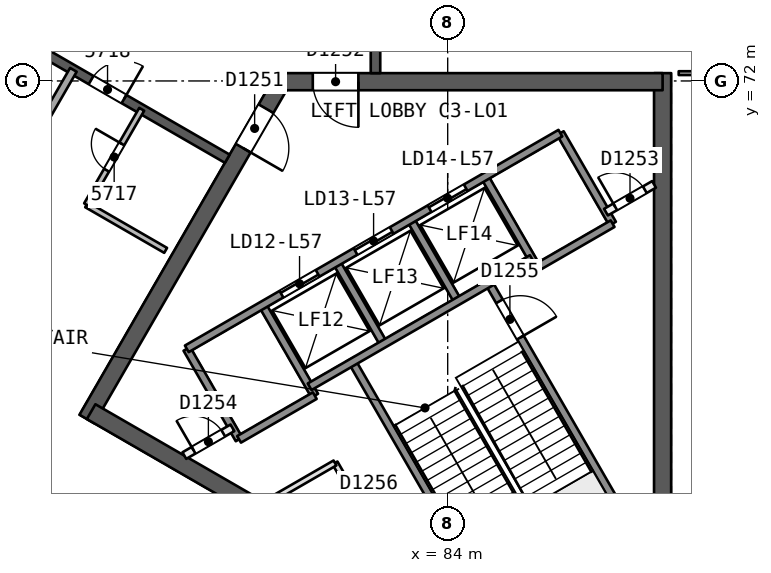
"""IFC4 building model, lengths in metres.
Left out: names, types, materials, properties, quantities, classifications, styles, units other than length and angle.
Written with IfcOpenShell. Run it as: python <this file> out.ifc"""

import sys

from ifc_helpers import new_model, si_unit, direction, frame, frame_2d, origin, place, context, subcontext, project, spatial, rectangle, extrude, element, fill, save


model = new_model("IFC4")
c1 = context("Model", 3, precision=1e-05, world=origin(), true_north=direction((0.0, 1.0)))
c2 = subcontext(c1, "Body", "Model", "MODEL_VIEW")
j1 = project(units=[si_unit("LENGTHUNIT", "METRE"), si_unit("PLANEANGLEUNIT", "RADIAN")], contexts=[c1])
p1 = place(None, origin())
s1 = spatial("IfcSite", under=j1, at=p1, CompositionType="ELEMENT")
p2 = place(p1, origin())
s2 = spatial("IfcBuilding", under=s1, at=p2, CompositionType="ELEMENT")
p3 = place(p2, frame((0.0, 0.0, 231.7)))
s3 = spatial("IfcBuildingStorey", under=s2, at=p3, CompositionType="ELEMENT", Elevation=231.7)
p4 = place(p3, frame((79.63, 71.981, 0.0), z_axis=(0.0, 0.0, 1.0), x_axis=(-0.500002171595, -0.86602415001, 0.0)))
e1 = element("IfcWall", 1, at=p4, inside=s3, PredefinedType="SHEAR", context=c2, shape_type="SweptSolid", body=[
    extrude(rectangle(XDim=10.25, YDim=0.45, at=frame_2d((5.125, 0.0))), origin(), (0.0, 0.0, 1.0), 3.7),
])
p5 = place(p4, frame((0.82, 0.0, 0.0)))
e2 = element("IfcOpeningElement", 2, at=p5, cuts=e1, PredefinedType="OPENING", context=c2, shape_type="SweptSolid", body=[
    extrude(rectangle(XDim=1.2, YDim=2.1, at=frame_2d((0.6, 1.05))), frame((0.0, 0.235, 0.0), z_axis=(0.0, -1.0, 0.0), x_axis=(1.0, 0.0, 0.0)), (0.0, 0.0, 1.0), 0.471),
])
p6 = place(p3, frame((74.617, 63.299, 0.0), z_axis=(0.0, 0.0, 1.0), x_axis=(0.86602594008, -0.499999071108, 0.0)))
e3 = element("IfcWall", 3, at=p6, inside=s3, PredefinedType="SHEAR", context=c2, shape_type="SweptSolid", body=[
    extrude(rectangle(XDim=14.108, YDim=0.45, at=frame_2d((7.054, 0.0))), origin(), (0.0, 0.0, 1.0), 3.7),
])
p7 = place(p3, frame((89.655, 58.002, 0.0), z_axis=(0.0, 0.0, 1.0), x_axis=(0.0, 1.0, 0.0)))
e4 = element("IfcWall", 4, at=p7, inside=s3, PredefinedType="SHEAR", context=c2, shape_type="SweptSolid", body=[
    extrude(rectangle(XDim=14.204, YDim=0.45, at=frame_2d((7.102, 0.0))), origin(), (0.0, 0.0, 1.0), 3.7),
])
p8 = place(p3, frame((89.655, 71.981, 0.0), z_axis=(0.0, 0.0, 1.0), x_axis=(-1.0, 0.0, 0.0)))
e5 = element("IfcWall", 5, at=p8, inside=s3, PredefinedType="SHEAR", context=c2, shape_type="SweptSolid", body=[
    extrude(rectangle(XDim=10.155, YDim=0.45, at=frame_2d((5.078, 0.0))), origin(), (0.0, 0.0, 1.0), 3.7),
])
p9 = place(p8, frame((8.005, 0.0, 0.0)))
e6 = element("IfcOpeningElement", 6, at=p9, cuts=e5, PredefinedType="OPENING", context=c2, shape_type="SweptSolid", body=[
    extrude(rectangle(XDim=1.2, YDim=2.1, at=frame_2d((0.6, 1.05))), frame((0.0, 0.235, 0.0), z_axis=(0.0, -1.0, 0.0), x_axis=(1.0, 0.0, 0.0)), (0.0, 0.0, 1.0), 0.471),
])
p10 = place(p3, frame((82.1, 72.206, 0.0), z_axis=(0.0, 0.0, 1.0), x_axis=(0.0, 1.0, 0.0)))
e7 = element("IfcWall", 7, at=p10, inside=s3, PredefinedType="SHEAR", context=c2, shape_type="SweptSolid", body=[
    extrude(rectangle(XDim=15.588, YDim=0.25, at=frame_2d((7.794, 0.0))), origin(), (0.0, 0.0, 1.0), 3.3),
])
p11 = place(p10, frame((2.15, 0.0, 0.0)))
e8 = element("IfcOpeningElement", 8, at=p11, cuts=e7, PredefinedType="OPENING", context=c2, shape_type="SweptSolid", body=[
    extrude(rectangle(XDim=1.0, YDim=2.1, at=frame_2d((0.5, 1.05))), frame((0.0, 0.135, 0.0), z_axis=(0.0, -1.0, 0.0), x_axis=(1.0, 0.0, 0.0)), (0.0, 0.0, 1.0), 0.271),
])
p12 = place(p10, frame((7.662, 0.0, 0.0)))
e9 = element("IfcOpeningElement", 9, at=p12, cuts=e7, PredefinedType="OPENING", context=c2, shape_type="SweptSolid", body=[
    extrude(rectangle(XDim=1.2, YDim=2.4, at=frame_2d((0.6, 1.2))), frame((0.0, 0.135, 0.0), z_axis=(0.0, -1.0, 0.0), x_axis=(1.0, 0.0, 0.0)), (0.0, 0.0, 1.0), 0.271),
])
p13 = place(p10, frame((11.606, 0.0, 0.0)))
e10 = element("IfcOpeningElement", 10, at=p13, cuts=e7, PredefinedType="OPENING", context=c2, shape_type="SweptSolid", body=[
    extrude(rectangle(XDim=1.0, YDim=2.1, at=frame_2d((0.5, 1.05))), frame((0.0, 0.135, 0.0), z_axis=(0.0, -1.0, 0.0), x_axis=(1.0, 0.0, 0.0)), (0.0, 0.0, 1.0), 0.271),
])
p14 = place(p3, frame((64.7, 77.748, 0.0), z_axis=(0.0, 0.0, 1.0), x_axis=(0.866026492143, -0.499998114903, 0.0)))
e11 = element("IfcWall", 11, at=p14, inside=s3, PredefinedType="SHEAR", context=c2, shape_type="SweptSolid", body=[
    extrude(rectangle(XDim=15.588, YDim=0.25, at=frame_2d((7.794, 0.0))), origin(), (0.0, 0.0, 1.0), 3.3),
])
p15 = place(p14, frame((2.982, 0.0, 0.0)))
e12 = element("IfcOpeningElement", 12, at=p15, cuts=e11, PredefinedType="OPENING", context=c2, shape_type="SweptSolid", body=[
    extrude(rectangle(XDim=1.0, YDim=2.1, at=frame_2d((0.5, 1.05))), frame((0.0, 0.135, 0.0), z_axis=(0.0, -1.0, 0.0), x_axis=(1.0, 0.0, 0.0)), (0.0, 0.0, 1.0), 0.271),
])
p16 = place(p14, frame((8.538, 0.0, 0.0)))
e13 = element("IfcOpeningElement", 13, at=p16, cuts=e11, PredefinedType="OPENING", context=c2, shape_type="SweptSolid", body=[
    extrude(rectangle(XDim=1.1, YDim=2.1, at=frame_2d((0.55, 1.05))), frame((0.0, 0.135, 0.0), z_axis=(0.0, -1.0, 0.0), x_axis=(1.0, 0.0, 0.0)), (0.0, 0.0, 1.0), 0.271),
])
p17 = place(p14, frame((11.45, 0.0, 0.0)))
e14 = element("IfcOpeningElement", 14, at=p17, cuts=e11, PredefinedType="OPENING", context=c2, shape_type="SweptSolid", body=[
    extrude(rectangle(XDim=1.0, YDim=2.1, at=frame_2d((0.5, 1.05))), frame((0.0, 0.135, 0.0), z_axis=(0.0, -1.0, 0.0), x_axis=(1.0, 0.0, 0.0)), (0.0, 0.0, 1.0), 0.271),
])
p18 = place(p3, frame((90.079, 72.206, 0.0), z_axis=(0.0, 0.0, 1.0), x_axis=(1.0, 0.0, 0.0)))
e15 = element("IfcWall", 15, at=p18, inside=s3, PredefinedType="PARTITIONING", context=c2, shape_type="SweptSolid", body=[
    extrude(rectangle(XDim=2.2, YDim=0.1, at=frame_2d((1.1, 0.0))), origin(), (0.0, 0.0, 1.0), 3.3),
])
p19 = place(p18, frame((0.65, 0.0, 0.0)))
e16 = element("IfcOpeningElement", 16, at=p19, cuts=e15, PredefinedType="OPENING", context=c2, shape_type="SweptSolid", body=[
    extrude(rectangle(XDim=0.9, YDim=2.1, at=frame_2d((0.45, 1.05))), frame((0.0, 0.061, 0.0), z_axis=(0.0, -1.0, 0.0), x_axis=(1.0, 0.0, 0.0)), (0.0, 0.0, 1.0), 0.121),
])
p20 = place(p3, frame((69.061, 63.477, 0.0), z_axis=(0.0, 0.0, 1.0), x_axis=(0.499993053251, 0.866029414455, 0.0)))
e17 = element("IfcWall", 17, at=p20, inside=s3, PredefinedType="PARTITIONING", context=c2, shape_type="SweptSolid", body=[
    extrude(rectangle(XDim=10.179, YDim=0.2, at=frame_2d((5.089, 0.0))), origin(), (0.0, 0.0, 1.0), 3.3),
])
p21 = place(p3, frame((76.578, 67.542, 0.0), z_axis=(0.0, 0.0, 1.0), x_axis=(-0.866038271014, 0.499977712642, 0.0)))
e18 = element("IfcWall", 18, at=p21, inside=s3, PredefinedType="PARTITIONING", context=c2, shape_type="SweptSolid", body=[
    extrude(rectangle(XDim=2.401, YDim=0.15, at=frame_2d((1.2, 0.0))), origin(), (0.0, 0.0, 1.0), 3.3),
])
p22 = place(p3, frame((74.498, 68.743, 0.0), z_axis=(0.0, 0.0, 1.0), x_axis=(0.499987231761, 0.866032775405, 0.0)))
e19 = element("IfcWall", 19, at=p22, inside=s3, PredefinedType="PARTITIONING", context=c2, shape_type="SweptSolid", body=[
    extrude(rectangle(XDim=2.9, YDim=0.15, at=frame_2d((1.45, 0.0))), origin(), (0.0, 0.0, 1.0), 3.3),
])
p23 = place(p22, frame((1.05, 0.0, 0.0)))
e20 = element("IfcOpeningElement", 20, at=p23, cuts=e19, PredefinedType="OPENING", context=c2, shape_type="SweptSolid", body=[
    extrude(rectangle(XDim=0.8, YDim=2.1, at=frame_2d((0.4, 1.05))), frame((0.0, 0.085, 0.0), z_axis=(0.0, -1.0, 0.0), x_axis=(1.0, 0.0, 0.0)), (0.0, 0.0, 1.0), 0.171),
])
p24 = place(p3, frame((87.988, 52.377, 0.0), z_axis=(0.0, 0.0, 1.0), x_axis=(-0.866023992326, 0.500002444709, 0.0)))
e21 = element("IfcWall", 21, at=p24, inside=s3, PredefinedType="SOLIDWALL", context=c2, shape_type="SweptSolid", body=[
    extrude(rectangle(XDim=50.118, YDim=0.3, at=frame_2d((25.059, 0.0))), origin(), (0.0, 0.0, 1.0), 3.3),
])
p25 = place(p24, frame((24.015, 0.0, 0.0)))
e22 = element("IfcOpeningElement", 22, at=p25, cuts=e21, PredefinedType="OPENING", context=c2, shape_type="SweptSolid", body=[
    extrude(rectangle(XDim=2.4, YDim=2.4, at=frame_2d((1.2, 1.2))), frame((0.0, 0.161, 0.0), z_axis=(0.0, -1.0, 0.0), x_axis=(1.0, 0.0, 0.0)), (0.0, 0.0, 1.0), 0.321),
])
p26 = place(p24, frame((38.146, 0.0, 0.0)))
e23 = element("IfcOpeningElement", 23, at=p26, cuts=e21, PredefinedType="OPENING", context=c2, shape_type="SweptSolid", body=[
    extrude(rectangle(XDim=2.4, YDim=2.4, at=frame_2d((1.2, 1.2))), frame((0.0, 0.161, 0.0), z_axis=(0.0, -1.0, 0.0), x_axis=(1.0, 0.0, 0.0)), (0.0, 0.0, 1.0), 0.321),
])
p27 = place(p24, frame((9.727, 0.0, 0.0)))
e24 = element("IfcOpeningElement", 24, at=p27, cuts=e21, PredefinedType="OPENING", context=c2, shape_type="SweptSolid", body=[
    extrude(rectangle(XDim=2.4, YDim=2.4, at=frame_2d((1.2, 1.2))), frame((0.0, 0.161, 0.0), z_axis=(0.0, -1.0, 0.0), x_axis=(1.0, 0.0, 0.0)), (0.0, 0.0, 1.0), 0.321),
])
p28 = place(p3, frame((77.135, 64.952, 0.0), z_axis=(0.0, 0.0, 1.0), x_axis=(0.499996545922, -0.866027397988, 0.0)))
e25 = element("IfcWall", 25, at=p28, inside=s3, PredefinedType="SOLIDWALL", context=c2, shape_type="SweptSolid", body=[
    extrude(rectangle(XDim=2.75, YDim=0.2, at=frame_2d((1.375, 0.0))), origin(), (0.0, 0.0, 1.0), 3.3),
])
p29 = place(p3, frame((81.034, 61.949, 0.0), z_axis=(0.0, 0.0, 1.0), x_axis=(0.499945732631, -0.866056732798, 0.0)))
e26 = element("IfcWall", 26, at=p29, inside=s3, PredefinedType="PARTITIONING", context=c2, shape_type="SweptSolid", body=[
    extrude(rectangle(XDim=3.628, YDim=0.15, at=frame_2d((1.814, 0.0))), origin(), (0.0, 0.0, 1.0), 3.3),
])
p30 = place(p29, frame((1.337, 0.0, 0.0)))
e27 = element("IfcOpeningElement", 27, at=p30, cuts=e26, PredefinedType="OPENING", context=c2, shape_type="SweptSolid", body=[
    extrude(rectangle(XDim=0.9, YDim=2.1, at=frame_2d((0.45, 1.05))), frame((0.0, 0.085, 0.0), z_axis=(0.0, -1.0, 0.0), x_axis=(1.0, 0.0, 0.0)), (0.0, 0.0, 1.0), 0.171),
])
p31 = place(p3, frame((79.127, 66.102, 0.0), z_axis=(0.0, 0.0, 1.0), x_axis=(0.499996545922, -0.866027397988, 0.0)))
e28 = element("IfcWall", 28, at=p31, inside=s3, PredefinedType="SOLIDWALL", context=c2, shape_type="SweptSolid", body=[
    extrude(rectangle(XDim=2.75, YDim=0.2, at=frame_2d((1.375, 0.0))), origin(), (0.0, 0.0, 1.0), 3.3),
])
p32 = place(p3, frame((81.493, 64.604, 0.0), z_axis=(0.0, 0.0, 1.0), x_axis=(0.500006057782, -0.866021906294, 0.0)))
e29 = element("IfcWall", 29, at=p32, inside=s3, PredefinedType="SOLIDWALL", context=c2, shape_type="SweptSolid", body=[
    extrude(rectangle(XDim=7.7, YDim=0.2, at=frame_2d((3.85, 0.0))), origin(), (0.0, 0.0, 1.0), 3.3),
])
for number, where, z_axis, x_axis in (
    (30, (81.076, 67.227, 0.0), (0.0, 0.0, 1.0), (0.5, -0.866, 0.0)),
    (31, (83.024, 68.352, 0.0), (0.0, 0.0, 1.0), (0.5, -0.866, 0.0)),
):
    element("IfcWall", number, at=place(p3, frame(where, z_axis=z_axis, x_axis=x_axis)), inside=s3, PredefinedType="SOLIDWALL", context=c2, shape_type="SweptSolid", body=[
        extrude(rectangle(XDim=2.48, YDim=0.2, at=frame_2d((1.24, 0.0))), origin(), (0.0, 0.0, 1.0), 3.3),
    ])
p33 = place(p3, frame((85.087, 66.679, 0.0), z_axis=(0.0, 0.0, 1.0), x_axis=(0.500019787375, -0.866013979237, 0.0)))
e32 = element("IfcWall", 32, at=p33, inside=s3, PredefinedType="SOLIDWALL", context=c2, shape_type="SweptSolid", body=[
    extrude(rectangle(XDim=7.7, YDim=0.2, at=frame_2d((3.85, 0.0))), origin(), (0.0, 0.0, 1.0), 3.3),
])
p34 = place(p33, frame((0.55, 0.0, 0.0)))
e33 = element("IfcOpeningElement", 33, at=p34, cuts=e32, PredefinedType="OPENING", context=c2, shape_type="SweptSolid", body=[
    extrude(rectangle(XDim=1.1, YDim=2.1, at=frame_2d((0.55, 1.05))), frame((0.0, 0.11, 0.0), z_axis=(0.0, -1.0, 0.0), x_axis=(1.0, 0.0, 0.0)), (0.0, 0.0, 1.0), 0.221),
])
for number, where, z_axis, x_axis in (
    (34, (84.973, 69.477, 0.0), (0.0, 0.0, 1.0), (0.5, -0.866, 0.0)),
    (35, (86.965, 70.626, 0.0), (0.0, 0.0, 1.0), (0.5, -0.866, 0.0)),
):
    element("IfcWall", number, at=place(p3, frame(where, z_axis=z_axis, x_axis=x_axis)), inside=s3, PredefinedType="SOLIDWALL", context=c2, shape_type="SweptSolid", body=[
        extrude(rectangle(XDim=2.75, YDim=0.2, at=frame_2d((1.375, 0.0))), origin(), (0.0, 0.0, 1.0), 3.3),
    ])
p35 = place(p3, frame((77.135, 64.952, 0.0), z_axis=(0.0, 0.0, 1.0), x_axis=(0.866031916153, 0.499988720078, 0.0)))
e36 = element("IfcWall", 36, at=p35, inside=s3, PredefinedType="SOLIDWALL", context=c2, shape_type="SweptSolid", body=[
    extrude(rectangle(XDim=11.35, YDim=0.2, at=frame_2d((5.675, 0.0))), origin(), (0.0, 0.0, 1.0), 3.3),
])
p36 = place(p35, frame((2.875, 0.0, 0.0)))
e37 = element("IfcOpeningElement", 37, at=p36, cuts=e36, PredefinedType="OPENING", context=c2, shape_type="SweptSolid", body=[
    extrude(rectangle(XDim=1.1, YDim=2.1, at=frame_2d((0.55, 1.05))), frame((0.0, 0.11, 0.0), z_axis=(0.0, -1.0, 0.0), x_axis=(1.0, 0.0, 0.0)), (0.0, 0.0, 1.0), 0.221),
])
p37 = place(p35, frame((5.125, 0.0, 0.0)))
e38 = element("IfcOpeningElement", 38, at=p37, cuts=e36, PredefinedType="OPENING", context=c2, shape_type="SweptSolid", body=[
    extrude(rectangle(XDim=1.1, YDim=2.1, at=frame_2d((0.55, 1.05))), frame((0.0, 0.11, 0.0), z_axis=(0.0, -1.0, 0.0), x_axis=(1.0, 0.0, 0.0)), (0.0, 0.0, 1.0), 0.221),
])
p38 = place(p35, frame((7.375, 0.0, 0.0)))
e39 = element("IfcOpeningElement", 39, at=p38, cuts=e36, PredefinedType="OPENING", context=c2, shape_type="SweptSolid", body=[
    extrude(rectangle(XDim=1.1, YDim=2.1, at=frame_2d((0.55, 1.05))), frame((0.0, 0.11, 0.0), z_axis=(0.0, -1.0, 0.0), x_axis=(1.0, 0.0, 0.0)), (0.0, 0.0, 1.0), 0.221),
])
p39 = place(p3, frame((77.07, 62.143, 0.0), z_axis=(0.0, 0.0, 1.0), x_axis=(0.866013036001, 0.500021421018, 0.0)))
e40 = element("IfcWall", 40, at=p39, inside=s3, PredefinedType="PARTITIONING", context=c2, shape_type="SweptSolid", body=[
    extrude(rectangle(XDim=1.461, YDim=0.2, at=frame_2d((0.73, 0.0))), origin(), (0.0, 0.0, 1.0), 3.3),
])
p40 = place(p39, frame((0.281, 0.0, 0.0)))
e41 = element("IfcOpeningElement", 41, at=p40, cuts=e40, PredefinedType="OPENING", context=c2, shape_type="SweptSolid", body=[
    extrude(rectangle(XDim=0.9, YDim=2.1, at=frame_2d((0.45, 1.05))), frame((0.0, 0.11, 0.0), z_axis=(0.0, -1.0, 0.0), x_axis=(1.0, 0.0, 0.0)), (0.0, 0.0, 1.0), 0.221),
])
p41 = place(p3, frame((88.165, 68.548, 0.0), z_axis=(0.0, 0.0, 1.0), x_axis=(0.866013036001, 0.500021421018, 0.0)))
e42 = element("IfcWall", 42, at=p41, inside=s3, PredefinedType="PARTITIONING", context=c2, shape_type="SweptSolid", body=[
    extrude(rectangle(XDim=1.461, YDim=0.2, at=frame_2d((0.73, 0.0))), origin(), (0.0, 0.0, 1.0), 3.3),
])
p42 = place(p41, frame((0.281, 0.0, 0.0)))
e43 = element("IfcOpeningElement", 43, at=p42, cuts=e42, PredefinedType="OPENING", context=c2, shape_type="SweptSolid", body=[
    extrude(rectangle(XDim=0.9, YDim=2.1, at=frame_2d((0.45, 1.05))), frame((0.0, 0.11, 0.0), z_axis=(0.0, -1.0, 0.0), x_axis=(1.0, 0.0, 0.0)), (0.0, 0.0, 1.0), 0.221),
])
p43 = place(p3, frame((80.367, 63.954, 0.0), z_axis=(0.0, 0.0, 1.0), x_axis=(0.866026575979, 0.499997969693, 0.0)))
e44 = element("IfcWall", 44, at=p43, inside=s3, PredefinedType="SOLIDWALL", context=c2, shape_type="SweptSolid", body=[
    extrude(rectangle(XDim=6.75, YDim=0.2, at=frame_2d((3.375, 0.0))), origin(), (0.0, 0.0, 1.0), 3.3),
])
p44 = place(p3, frame((78.51, 62.57, 0.0), z_axis=(0.0, 0.0, 1.0), x_axis=(0.866053019151, 0.499952165731, 0.0)))
e45 = element("IfcWall", 45, at=p44, inside=s3, PredefinedType="SOLIDWALL", context=c2, shape_type="SweptSolid", body=[
    extrude(rectangle(XDim=2.3, YDim=0.2, at=frame_2d((1.15, 0.0))), origin(), (0.0, 0.0, 1.0), 3.3),
])
p45 = place(p3, frame((86.348, 67.095, 0.0), z_axis=(0.0, 0.0, 1.0), x_axis=(0.86602648383, 0.499998129301, 0.0)))
e46 = element("IfcWall", 46, at=p45, inside=s3, PredefinedType="SOLIDWALL", context=c2, shape_type="SweptSolid", body=[
    extrude(rectangle(XDim=2.3, YDim=0.2, at=frame_2d((1.15, 0.0))), origin(), (0.0, 0.0, 1.0), 3.3),
])
p46 = place(p3, frame((79.22, 60.901, 0.0), z_axis=(0.0, 0.0, 1.0), x_axis=(0.866040030748, 0.499974664501, 0.0)))
e47 = element("IfcWall", 47, at=p46, inside=s3, PredefinedType="PARTITIONING", context=c2, shape_type="SweptSolid", body=[
    extrude(rectangle(XDim=2.095, YDim=0.15, at=frame_2d((1.047, 0.0))), origin(), (0.0, 0.0, 1.0), 3.3),
])
p47 = place(p23, origin())
e48 = element("IfcDoor", 48, at=p47, inside=s3, OperationType="SINGLE_SWING_RIGHT", PredefinedType="NOTDEFINED", context=c2, shape_type="SweptSolid", body=[
    extrude(rectangle(XDim=0.8, YDim=2.1, at=frame_2d((0.4, 1.05))), frame((0.0, 0.025, 0.0), z_axis=(0.0, -1.0, 0.0), x_axis=(1.0, 0.0, 0.0)), (0.0, 0.0, 1.0), 0.05),
])
fill(e20, e48)
p48 = place(p17, origin())
e49 = element("IfcDoor", 49, at=p48, inside=s3, OperationType="SINGLE_SWING_RIGHT", PredefinedType="NOTDEFINED", context=c2, shape_type="SweptSolid", body=[
    extrude(rectangle(XDim=1.0, YDim=2.1, at=frame_2d((0.5, 1.05))), frame((0.0, 0.025, 0.0), z_axis=(0.0, -1.0, 0.0), x_axis=(1.0, 0.0, 0.0)), (0.0, 0.0, 1.0), 0.05),
])
fill(e14, e49)
p49 = place(p5, origin())
e50 = element("IfcDoor", 50, at=p49, inside=s3, OperationType="SINGLE_SWING_RIGHT", PredefinedType="NOTDEFINED", context=c2, shape_type="SweptSolid", body=[
    extrude(rectangle(XDim=1.2, YDim=2.1, at=frame_2d((0.6, 1.05))), frame((0.0, 0.025, 0.0), z_axis=(0.0, -1.0, 0.0), x_axis=(1.0, 0.0, 0.0)), (0.0, 0.0, 1.0), 0.05),
])
fill(e2, e50)
p50 = place(p9, origin())
e51 = element("IfcDoor", 51, at=p50, inside=s3, OperationType="SINGLE_SWING_LEFT", PredefinedType="NOTDEFINED", context=c2, shape_type="SweptSolid", body=[
    extrude(rectangle(XDim=1.2, YDim=2.1, at=frame_2d((0.6, 1.05))), frame((0.0, 0.025, 0.0), z_axis=(0.0, -1.0, 0.0), x_axis=(1.0, 0.0, 0.0)), (0.0, 0.0, 1.0), 0.05),
])
fill(e6, e51)
p51 = place(p36, origin())
e52 = element("IfcDoor", 52, at=p51, inside=s3, OperationType="SLIDING_TO_LEFT", PredefinedType="NOTDEFINED", context=c2, shape_type="SweptSolid", body=[
    extrude(rectangle(XDim=1.1, YDim=2.1, at=frame_2d((0.55, 1.05))), frame((0.0, 0.025, 0.0), z_axis=(0.0, -1.0, 0.0), x_axis=(1.0, 0.0, 0.0)), (0.0, 0.0, 1.0), 0.05),
])
fill(e37, e52)
p52 = place(p37, origin())
e53 = element("IfcDoor", 53, at=p52, inside=s3, OperationType="SLIDING_TO_RIGHT", PredefinedType="NOTDEFINED", context=c2, shape_type="SweptSolid", body=[
    extrude(rectangle(XDim=1.1, YDim=2.1, at=frame_2d((0.55, 1.05))), frame((0.0, 0.025, 0.0), z_axis=(0.0, -1.0, 0.0), x_axis=(1.0, 0.0, 0.0)), (0.0, 0.0, 1.0), 0.05),
])
fill(e38, e53)
p53 = place(p38, origin())
e54 = element("IfcDoor", 54, at=p53, inside=s3, OperationType="SLIDING_TO_LEFT", PredefinedType="NOTDEFINED", context=c2, shape_type="SweptSolid", body=[
    extrude(rectangle(XDim=1.1, YDim=2.1, at=frame_2d((0.55, 1.05))), frame((0.0, 0.025, 0.0), z_axis=(0.0, -1.0, 0.0), x_axis=(1.0, 0.0, 0.0)), (0.0, 0.0, 1.0), 0.05),
])
fill(e39, e54)
p54 = place(p42, origin())
e55 = element("IfcDoor", 55, at=p54, inside=s3, OperationType="SINGLE_SWING_LEFT", PredefinedType="NOTDEFINED", context=c2, shape_type="SweptSolid", body=[
    extrude(rectangle(XDim=0.9, YDim=2.1, at=frame_2d((0.45, 1.05))), frame((0.0, 0.025, 0.0), z_axis=(0.0, -1.0, 0.0), x_axis=(1.0, 0.0, 0.0)), (0.0, 0.0, 1.0), 0.05),
])
fill(e43, e55)
p55 = place(p40, origin())
e56 = element("IfcDoor", 56, at=p55, inside=s3, OperationType="SINGLE_SWING_LEFT", PredefinedType="NOTDEFINED", context=c2, shape_type="SweptSolid", body=[
    extrude(rectangle(XDim=0.9, YDim=2.1, at=frame_2d((0.45, 1.05))), frame((0.0, 0.025, 0.0), z_axis=(0.0, -1.0, 0.0), x_axis=(1.0, 0.0, 0.0)), (0.0, 0.0, 1.0), 0.05),
])
fill(e41, e56)
p56 = place(p34, origin())
e57 = element("IfcDoor", 57, at=p56, inside=s3, OperationType="SINGLE_SWING_RIGHT", PredefinedType="NOTDEFINED", context=c2, shape_type="SweptSolid", body=[
    extrude(rectangle(XDim=1.1, YDim=2.1, at=frame_2d((0.55, 1.05))), frame((0.0, 0.025, 0.0), z_axis=(0.0, -1.0, 0.0), x_axis=(1.0, 0.0, 0.0)), (0.0, 0.0, 1.0), 0.05),
])
fill(e33, e57)
save(model, sys.argv[1])
